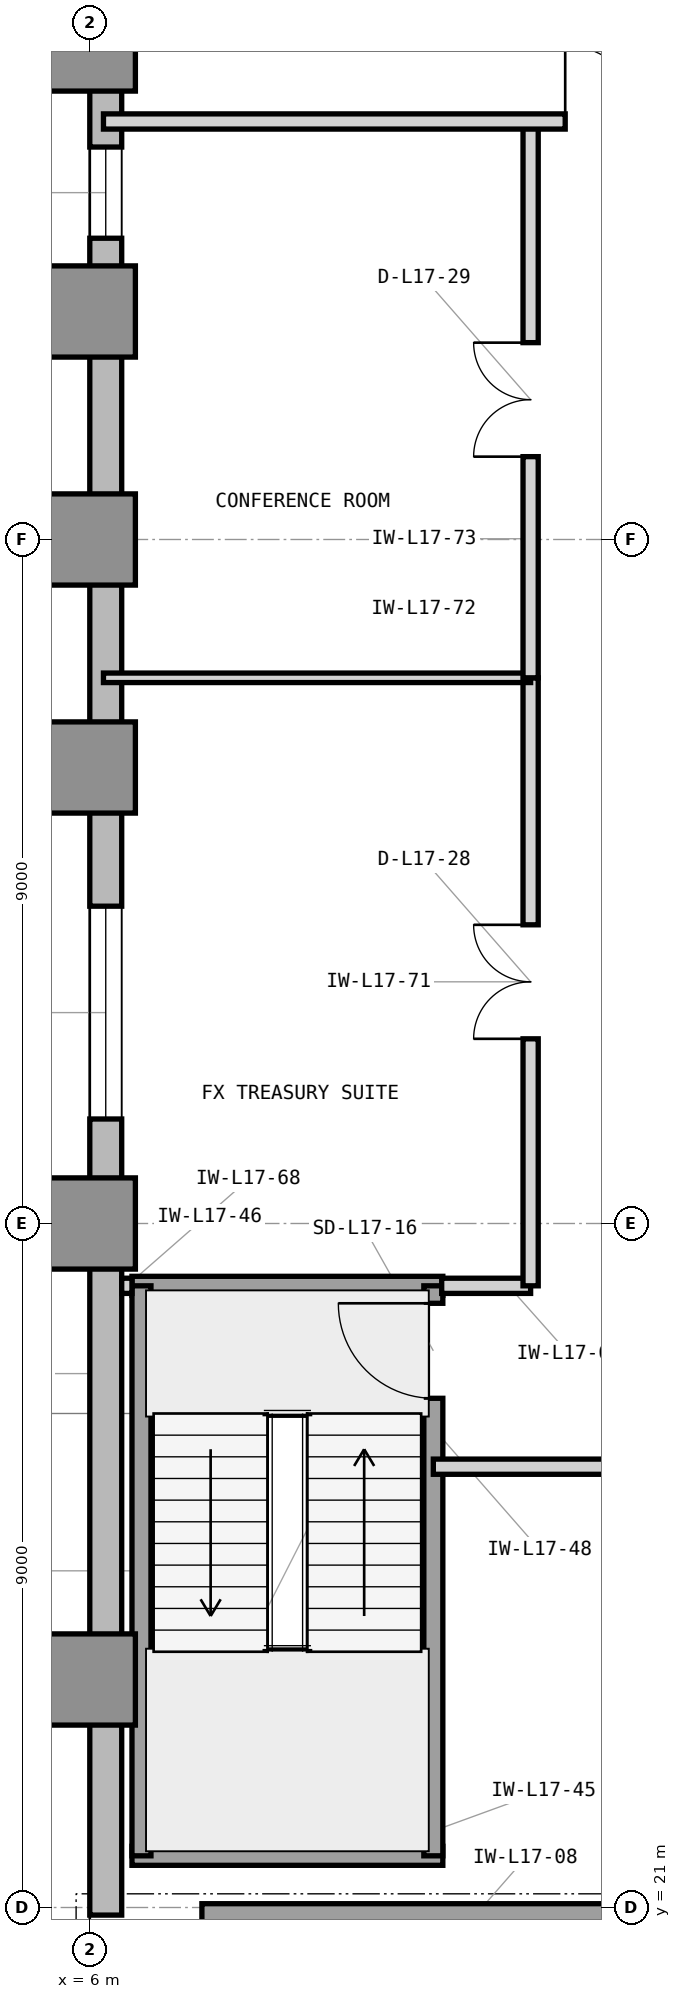
"""IFC4 building model, lengths in metres.
Left out: names, types, materials, properties, quantities, classifications, styles, units other than length and angle.
Written with IfcOpenShell. Run it as: python <this file> out.ifc"""

import sys

from ifc_helpers import new_model, si_unit, direction, frame, frame_2d, origin, origin_2d, place, context, subcontext, project, spatial, rectangle, extrude, element, fill, save


model = new_model("IFC4")
c1 = context("Model", 3, precision=1e-05, world=origin(), true_north=direction((0.0, 1.0)))
c2 = subcontext(c1, "Body", "Model", "MODEL_VIEW")
j1 = project(units=[si_unit("LENGTHUNIT", "METRE"), si_unit("PLANEANGLEUNIT", "RADIAN")], contexts=[c1])
p1 = place(None, origin())
s1 = spatial("IfcSite", under=j1, at=p1, CompositionType="ELEMENT")
p2 = place(p1, origin())
s2 = spatial("IfcBuilding", under=s1, at=p2, CompositionType="ELEMENT")
p3 = place(p2, frame((0.0, 0.0, 76.2)))
s3 = spatial("IfcBuildingStorey", under=s2, at=p3, CompositionType="ELEMENT", Elevation=76.2)
p4 = place(p3, frame((7.475, 20.65, 0.0), z_axis=(0.0, 0.0, 1.0), x_axis=(1.0, 0.0, 0.0)))
e1 = element("IfcWall", 1, at=p4, inside=s3, PredefinedType="SHEAR", context=c2, shape_type="SweptSolid", body=[
    extrude(rectangle(XDim=12.325, YDim=0.8, at=frame_2d((6.163, 0.0))), origin(), (0.0, 0.0, 1.0), 4.2),
])
for number, where, z_axis, x_axis in (
    (2, (6.0, 24.0, 0.0), (0.0, 0.0, 1.0), (1.0, 0.0, 0.0)),
    (3, (6.0, 30.0, 0.0), (0.0, 0.0, 1.0), (1.0, 0.0, 0.0)),
    (4, (6.0, 36.0, 0.0), (0.0, 0.0, 1.0), (1.0, 0.0, 0.0)),
    (5, (6.0, 39.0, 0.0), (0.0, 0.0, 1.0), (1.0, 0.0, 0.0)),
    (6, (6.0, 42.0, 0.0), (0.0, 0.0, 1.0), (1.0, 0.0, 0.0)),
    (7, (6.0, 45.5, 0.0), (0.0, 0.0, 1.0), (1.0, 0.0, 0.0)),
):
    element("IfcColumn", number, at=place(p3, frame(where, z_axis=z_axis, x_axis=x_axis)), inside=s3, PredefinedType="COLUMN", context=c2, shape_type="SweptSolid", body=[
        extrude(rectangle(XDim=1.2, YDim=1.2, at=origin_2d()), origin(), (0.0, 0.0, 1.0), 4.2),
    ])
p5 = place(p3, frame((6.21, 49.4, 0.0), z_axis=(0.0, 0.0, 1.0), x_axis=(0.0, -1.0, 0.0)))
e8 = element("IfcWall", 8, at=p5, inside=s3, PredefinedType="STANDARD", context=c2, shape_type="SweptSolid", body=[
    extrude(rectangle(XDim=28.5, YDim=0.42, at=frame_2d((14.25, 0.0))), origin(), (0.0, 0.0, 1.0), 3.98),
])
p6 = place(p5, frame((15.225, 0.0, 0.85)))
e9 = element("IfcOpeningElement", 9, at=p6, cuts=e8, PredefinedType="OPENING", context=c2, shape_type="SweptSolid", body=[
    extrude(rectangle(XDim=2.8, YDim=2.45, at=frame_2d((1.4, 1.225))), frame((0.0, 0.22, 0.0), z_axis=(0.0, -1.0, 0.0), x_axis=(1.0, 0.0, 0.0)), (0.0, 0.0, 1.0), 0.44),
])
p7 = place(p5, frame((5.236, 0.0, 0.85)))
e10 = element("IfcOpeningElement", 10, at=p7, cuts=e8, PredefinedType="OPENING", context=c2, shape_type="SweptSolid", body=[
    extrude(rectangle(XDim=1.2, YDim=2.45, at=frame_2d((0.6, 1.225))), frame((0.0, 0.22, 0.0), z_axis=(0.0, -1.0, 0.0), x_axis=(1.0, 0.0, 0.0)), (0.0, 0.0, 1.0), 0.44),
])
for number, where, z_axis, x_axis in (
    (11, (6.555, 21.68, 0.0), (0.0, 0.0, 1.0), (1.0, 0.0, 0.0)),
    (12, (6.555, 29.18, 0.0), (0.0, 0.0, 1.0), (1.0, 0.0, 0.0)),
):
    element("IfcWall", number, at=place(p3, frame(where, z_axis=z_axis, x_axis=x_axis)), inside=s3, PredefinedType="SHEAR", context=c2, shape_type="SweptSolid", body=[
        extrude(rectangle(XDim=4.09, YDim=0.25, at=frame_2d((2.045, 0.0))), origin(), (0.0, 0.0, 1.0), 4.2),
    ])
p8 = place(p3, frame((6.68, 21.68, 0.0), z_axis=(0.0, 0.0, 1.0), x_axis=(0.0, 1.0, 0.0)))
e13 = element("IfcWall", 13, at=p8, inside=s3, PredefinedType="SHEAR", context=c2, shape_type="SweptSolid", body=[
    extrude(rectangle(XDim=7.5, YDim=0.25, at=frame_2d((3.75, 0.0))), origin(), (0.0, 0.0, 1.0), 4.2),
])
p9 = place(p3, frame((10.52, 21.68, 0.0), z_axis=(0.0, 0.0, 1.0), x_axis=(0.0, 1.0, 0.0)))
e14 = element("IfcWall", 14, at=p9, inside=s3, PredefinedType="SHEAR", context=c2, shape_type="SweptSolid", body=[
    extrude(rectangle(XDim=7.5, YDim=0.25, at=frame_2d((3.75, 0.0))), origin(), (0.0, 0.0, 1.0), 4.2),
])
p10 = place(p9, frame((6.02, 0.0, 0.0)))
e15 = element("IfcOpeningElement", 15, at=p10, cuts=e14, PredefinedType="OPENING", context=c2, shape_type="SweptSolid", body=[
    extrude(rectangle(XDim=1.25, YDim=2.2, at=frame_2d((0.625, 1.1))), frame((0.0, 0.135, 0.0), z_axis=(0.0, -1.0, 0.0), x_axis=(1.0, 0.0, 0.0)), (0.0, 0.0, 1.0), 0.27),
])
p11 = place(p3, frame((10.52, 26.8, 0.0), z_axis=(0.0, 0.0, 1.0), x_axis=(1.0, 0.0, 0.0)))
e16 = element("IfcWall", 16, at=p11, inside=s3, PredefinedType="PARTITIONING", context=c2, shape_type="SweptSolid", body=[
    extrude(rectangle(XDim=9.28, YDim=0.2, at=frame_2d((4.64, 0.0))), origin(), (0.0, 0.0, 1.0), 3.97),
])
p12 = place(p11, frame((4.0, 0.0, 0.0)))
e17 = element("IfcOpeningElement", 17, at=p12, cuts=e16, PredefinedType="OPENING", context=c2, shape_type="SweptSolid", body=[
    extrude(rectangle(XDim=1.0, YDim=2.15, at=frame_2d((0.5, 1.075))), frame((0.0, 0.11, 0.0), z_axis=(0.0, -1.0, 0.0), x_axis=(1.0, 0.0, 0.0)), (0.0, 0.0, 1.0), 0.22),
])
p13 = place(p3, frame((6.42, 29.18, 0.0), z_axis=(0.0, 0.0, 1.0), x_axis=(1.0, 0.0, 0.0)))
e18 = element("IfcWall", 18, at=p13, inside=s3, PredefinedType="PARTITIONING", context=c2, shape_type="SweptSolid", body=[
    extrude(rectangle(XDim=0.135, YDim=0.2, at=frame_2d((0.067, 0.0))), origin(), (0.0, 0.0, 1.0), 3.97),
])
p14 = place(p3, frame((10.63, 29.18, 0.0), z_axis=(0.0, 0.0, 1.0), x_axis=(1.0, 0.0, 0.0)))
e19 = element("IfcWall", 19, at=p14, inside=s3, PredefinedType="PARTITIONING", context=c2, shape_type="SweptSolid", body=[
    extrude(rectangle(XDim=1.17, YDim=0.2, at=frame_2d((0.585, 0.0))), origin(), (0.0, 0.0, 1.0), 3.97),
])
p15 = place(p3, frame((11.8, 29.18, 0.0), z_axis=(0.0, 0.0, 1.0), x_axis=(0.0, 1.0, 0.0)))
e20 = element("IfcWall", 20, at=p15, inside=s3, PredefinedType="PARTITIONING", context=c2, shape_type="SweptSolid", body=[
    extrude(rectangle(XDim=8.0, YDim=0.2, at=frame_2d((4.0, 0.0))), origin(), (0.0, 0.0, 1.0), 3.97),
])
p16 = place(p15, frame((3.25, 0.0, 0.0)))
e21 = element("IfcOpeningElement", 21, at=p16, cuts=e20, PredefinedType="OPENING", context=c2, shape_type="SweptSolid", body=[
    extrude(rectangle(XDim=1.5, YDim=2.3, at=frame_2d((0.75, 1.15))), frame((0.0, 0.11, 0.0), z_axis=(0.0, -1.0, 0.0), x_axis=(1.0, 0.0, 0.0)), (0.0, 0.0, 1.0), 0.22),
])
p17 = place(p3, frame((6.18, 37.18, 0.0), z_axis=(0.0, 0.0, 1.0), x_axis=(1.0, 0.0, 0.0)))
e22 = element("IfcWall", 22, at=p17, inside=s3, PredefinedType="PARTITIONING", context=c2, shape_type="SweptSolid", body=[
    extrude(rectangle(XDim=5.62, YDim=0.125, at=frame_2d((2.81, 0.0))), origin(), (0.0, 0.0, 1.0), 3.97),
])
p18 = place(p3, frame((11.8, 37.18, 0.0), z_axis=(0.0, 0.0, 1.0), x_axis=(0.0, 1.0, 0.0)))
e23 = element("IfcWall", 23, at=p18, inside=s3, PredefinedType="PARTITIONING", context=c2, shape_type="SweptSolid", body=[
    extrude(rectangle(XDim=7.32, YDim=0.2, at=frame_2d((3.66, 0.0))), origin(), (0.0, 0.0, 1.0), 3.97),
])
p19 = place(p18, frame((2.91, 0.0, 0.0)))
e24 = element("IfcOpeningElement", 24, at=p19, cuts=e23, PredefinedType="OPENING", context=c2, shape_type="SweptSolid", body=[
    extrude(rectangle(XDim=1.5, YDim=2.3, at=frame_2d((0.75, 1.15))), frame((0.0, 0.11, 0.0), z_axis=(0.0, -1.0, 0.0), x_axis=(1.0, 0.0, 0.0)), (0.0, 0.0, 1.0), 0.22),
])
p20 = place(p3, frame((6.18, 44.5, 0.0), z_axis=(0.0, 0.0, 1.0), x_axis=(1.0, 0.0, 0.0)))
e25 = element("IfcWall", 25, at=p20, inside=s3, PredefinedType="PARTITIONING", context=c2, shape_type="SweptSolid", body=[
    extrude(rectangle(XDim=17.64, YDim=0.2, at=frame_2d((8.82, 0.0))), origin(), (0.0, 0.0, 1.0), 3.97),
])
p21 = place(p20, frame((6.075, 0.0, 0.0)))
e26 = element("IfcOpeningElement", 26, at=p21, cuts=e25, PredefinedType="OPENING", context=c2, shape_type="SweptSolid", body=[
    extrude(rectangle(XDim=1.0, YDim=2.15, at=frame_2d((0.5, 1.075))), frame((0.0, 0.11, 0.0), z_axis=(0.0, -1.0, 0.0), x_axis=(1.0, 0.0, 0.0)), (0.0, 0.0, 1.0), 0.22),
])
p22 = place(p6, origin())
e27 = element("IfcWindow", 27, at=p22, inside=s3, PartitioningType="SINGLE_PANEL", PredefinedType="WINDOW", context=c2, shape_type="SweptSolid", body=[
    extrude(rectangle(XDim=2.8, YDim=2.45, at=frame_2d((1.4, 1.225))), frame((0.0, 0.11, 0.0), z_axis=(0.0, -1.0, 0.0), x_axis=(1.0, 0.0, 0.0)), (0.0, 0.0, 1.0), 0.06),
])
fill(e9, e27)
p23 = place(p10, origin())
e28 = element("IfcDoor", 28, at=p23, inside=s3, OperationType="SINGLE_SWING_RIGHT", PredefinedType="DOOR", context=c2, shape_type="SweptSolid", body=[
    extrude(rectangle(XDim=1.25, YDim=2.2, at=frame_2d((0.625, 1.1))), frame((0.0, 0.025, 0.0), z_axis=(0.0, -1.0, 0.0), x_axis=(1.0, 0.0, 0.0)), (0.0, 0.0, 1.0), 0.05),
])
fill(e15, e28)
p24 = place(p16, origin())
e29 = element("IfcDoor", 29, at=p24, inside=s3, OperationType="DOUBLE_DOOR_SINGLE_SWING", PredefinedType="DOOR", context=c2, shape_type="SweptSolid", body=[
    extrude(rectangle(XDim=1.5, YDim=2.3, at=frame_2d((0.75, 1.15))), frame((0.0, 0.025, 0.0), z_axis=(0.0, -1.0, 0.0), x_axis=(1.0, 0.0, 0.0)), (0.0, 0.0, 1.0), 0.05),
])
fill(e21, e29)
p25 = place(p19, origin())
e30 = element("IfcDoor", 30, at=p25, inside=s3, OperationType="DOUBLE_DOOR_SINGLE_SWING", PredefinedType="DOOR", context=c2, shape_type="SweptSolid", body=[
    extrude(rectangle(XDim=1.5, YDim=2.3, at=frame_2d((0.75, 1.15))), frame((0.0, 0.025, 0.0), z_axis=(0.0, -1.0, 0.0), x_axis=(1.0, 0.0, 0.0)), (0.0, 0.0, 1.0), 0.05),
])
fill(e24, e30)
p26 = place(p21, origin())
e31 = element("IfcDoor", 31, at=p26, inside=s3, OperationType="SINGLE_SWING_LEFT", PredefinedType="DOOR", context=c2, shape_type="SweptSolid", body=[
    extrude(rectangle(XDim=1.0, YDim=2.15, at=frame_2d((0.5, 1.075))), frame((0.0, 0.025, 0.0), z_axis=(0.0, -1.0, 0.0), x_axis=(1.0, 0.0, 0.0)), (0.0, 0.0, 1.0), 0.05),
])
fill(e26, e31)
p27 = place(p7, origin())
e32 = element("IfcWindow", 32, at=p27, inside=s3, PartitioningType="SINGLE_PANEL", PredefinedType="WINDOW", context=c2, shape_type="SweptSolid", body=[
    extrude(rectangle(XDim=1.2, YDim=2.45, at=frame_2d((0.6, 1.225))), frame((0.0, 0.11, 0.0), z_axis=(0.0, -1.0, 0.0), x_axis=(1.0, 0.0, 0.0)), (0.0, 0.0, 1.0), 0.06),
])
fill(e10, e32)
save(model, sys.argv[1])
